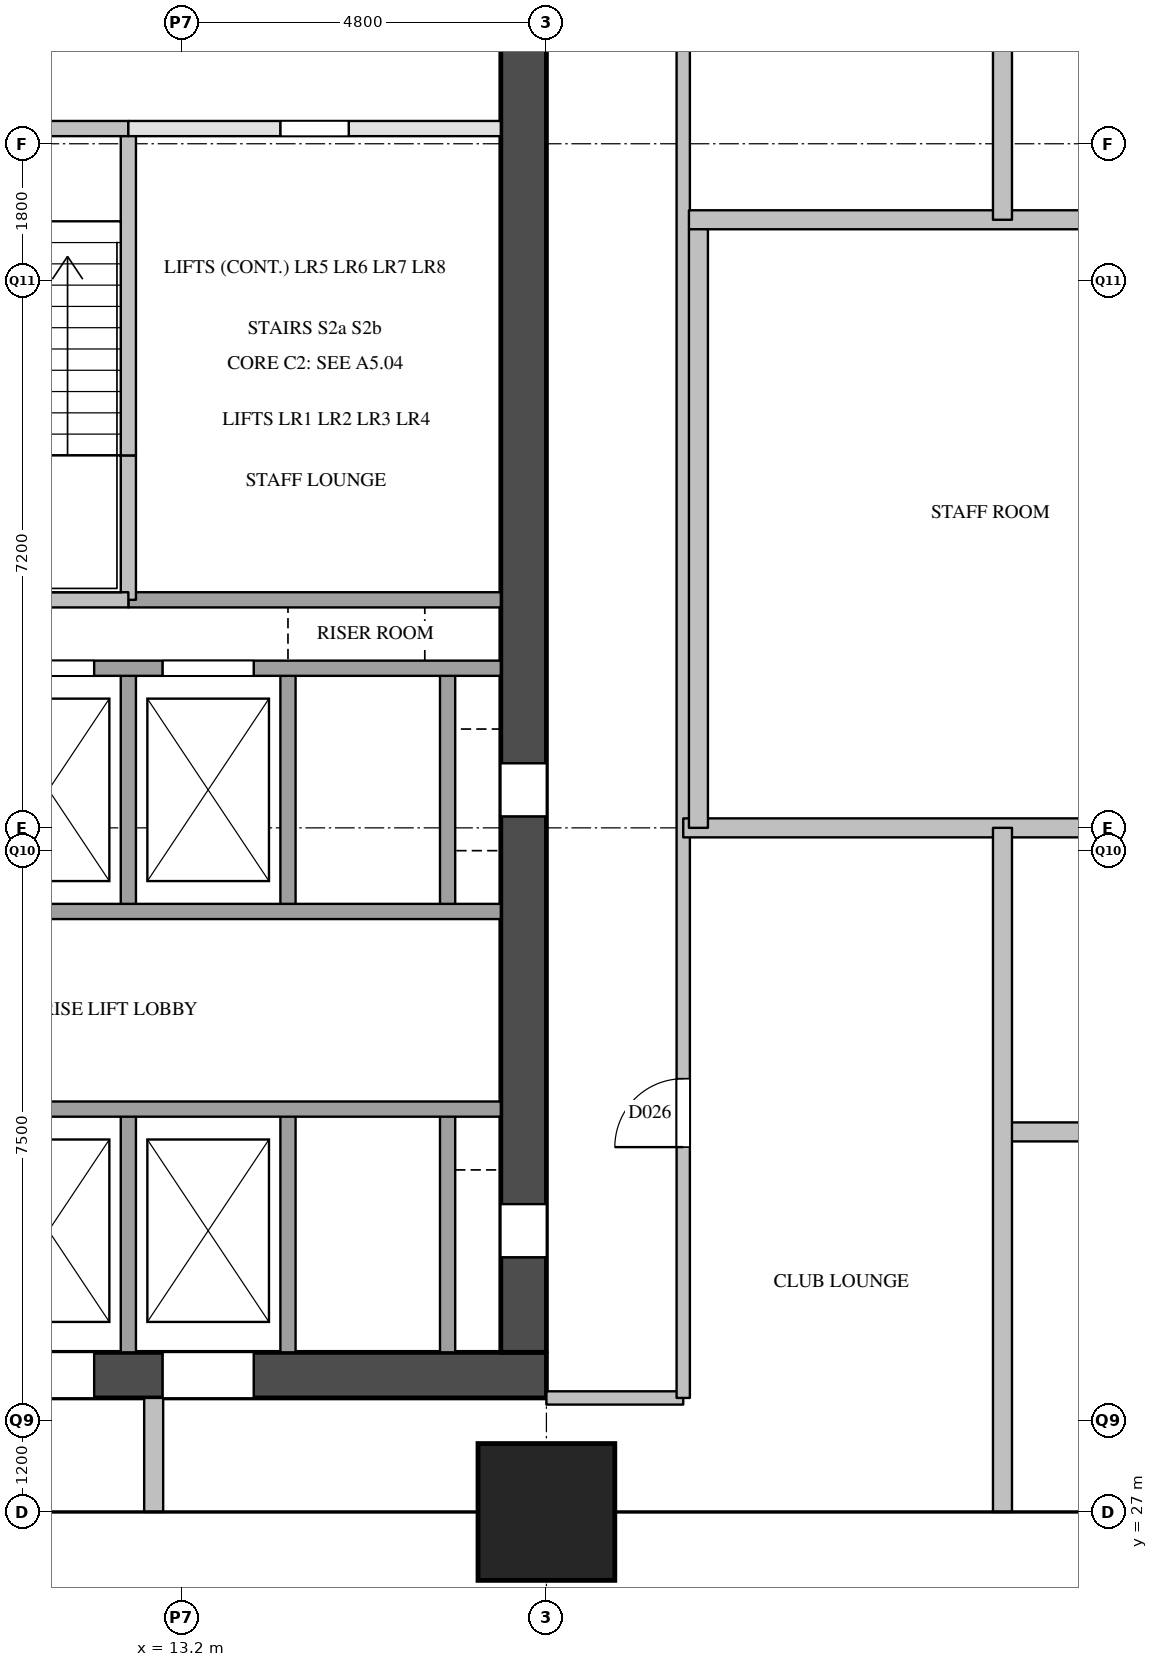
"""IFC4 building model, lengths in metres.
Left out: names, types, materials, properties, quantities, classifications, styles, units other than length and angle.
Written with IfcOpenShell. Run it as: python <this file> out.ifc"""

import sys

from ifc_helpers import new_model, si_unit, direction, frame, frame_2d, origin, origin_2d, place, context, subcontext, project, spatial, rectangle, extrude, element, fill, save


model = new_model("IFC4")
c1 = context("Model", 3, precision=1e-05, world=origin(), true_north=direction((0.0, 1.0)))
c2 = subcontext(c1, "Body", "Model", "MODEL_VIEW")
j1 = project(units=[si_unit("LENGTHUNIT", "METRE"), si_unit("PLANEANGLEUNIT", "RADIAN")], contexts=[c1])
p1 = place(None, origin())
s1 = spatial("IfcSite", under=j1, at=p1, CompositionType="ELEMENT")
p2 = place(p1, origin())
s2 = spatial("IfcBuilding", under=s1, at=p2, CompositionType="ELEMENT")
p3 = place(p2, frame((0.0, 0.0, 108.2)))
s3 = spatial("IfcBuildingStorey", under=s2, at=p3, CompositionType="ELEMENT", Elevation=108.2)
p4 = place(p3, frame((18.0, 27.0, 0.0), z_axis=(0.0, 0.0, 1.0), x_axis=(1.0, 0.0, 0.0)))
e1 = element("IfcColumn", 1, at=p4, inside=s3, PredefinedType="COLUMN", context=c2, shape_type="SweptSolid", body=[
    extrude(rectangle(XDim=1.8, YDim=1.8, at=origin_2d()), origin(), (0.0, 0.0, 1.0), 3.8),
])
p5 = place(p3, frame((5.6, 28.8, 0.0), z_axis=(0.0, 0.0, 1.0), x_axis=(1.0, 0.0, 0.0)))
e2 = element("IfcWall", 2, at=p5, inside=s3, PredefinedType="SHEAR", context=c2, shape_type="SweptSolid", body=[
    extrude(rectangle(XDim=12.4, YDim=0.6, at=frame_2d((6.2, 0.0))), origin(), (0.0, 0.0, 1.0), 3.5),
])
p6 = place(p5, frame((1.05, 0.0, 0.0)))
e3 = element("IfcOpeningElement", 3, at=p6, cuts=e2, PredefinedType="OPENING", context=c2, shape_type="SweptSolid", body=[
    extrude(rectangle(XDim=1.2, YDim=2.1, at=frame_2d((0.6, 1.05))), frame((0.0, 0.31, 0.0), z_axis=(0.0, -1.0, 0.0), x_axis=(1.0, 0.0, 0.0)), (0.0, 0.0, 1.0), 0.62),
])
p7 = place(p5, frame((5.25, 0.0, 0.0)))
e4 = element("IfcOpeningElement", 4, at=p7, cuts=e2, PredefinedType="OPENING", context=c2, shape_type="SweptSolid", body=[
    extrude(rectangle(XDim=1.2, YDim=2.1, at=frame_2d((0.6, 1.05))), frame((0.0, 0.31, 0.0), z_axis=(0.0, -1.0, 0.0), x_axis=(1.0, 0.0, 0.0)), (0.0, 0.0, 1.0), 0.62),
])
p8 = place(p5, frame((7.35, 0.0, 0.0)))
e5 = element("IfcOpeningElement", 5, at=p8, cuts=e2, PredefinedType="OPENING", context=c2, shape_type="SweptSolid", body=[
    extrude(rectangle(XDim=1.2, YDim=2.1, at=frame_2d((0.6, 1.05))), frame((0.0, 0.31, 0.0), z_axis=(0.0, -1.0, 0.0), x_axis=(1.0, 0.0, 0.0)), (0.0, 0.0, 1.0), 0.62),
])
p9 = place(p3, frame((17.7, 29.1, 0.0), z_axis=(0.0, 0.0, 1.0), x_axis=(0.0, 1.0, 0.0)))
e6 = element("IfcWall", 6, at=p9, inside=s3, PredefinedType="SHEAR", context=c2, shape_type="SweptSolid", body=[
    extrude(rectangle(XDim=20.3, YDim=0.6, at=frame_2d((10.15, 0.0))), origin(), (0.0, 0.0, 1.0), 3.5),
])
p10 = place(p9, frame((1.25, 0.0, 0.0)))
e7 = element("IfcOpeningElement", 7, at=p10, cuts=e6, PredefinedType="OPENING", context=c2, shape_type="SweptSolid", body=[
    extrude(rectangle(XDim=0.7, YDim=2.1, at=frame_2d((0.35, 1.05))), frame((0.0, 0.31, 0.0), z_axis=(0.0, -1.0, 0.0), x_axis=(1.0, 0.0, 0.0)), (0.0, 0.0, 1.0), 0.62),
])
p11 = place(p9, frame((7.05, 0.0, 0.0)))
e8 = element("IfcOpeningElement", 8, at=p11, cuts=e6, PredefinedType="OPENING", context=c2, shape_type="SweptSolid", body=[
    extrude(rectangle(XDim=0.7, YDim=2.1, at=frame_2d((0.35, 1.05))), frame((0.0, 0.31, 0.0), z_axis=(0.0, -1.0, 0.0), x_axis=(1.0, 0.0, 0.0)), (0.0, 0.0, 1.0), 0.62),
])
p12 = place(p3, frame((12.5, 29.1, 0.0), z_axis=(0.0, 0.0, 1.0), x_axis=(0.0, 1.0, 0.0)))
e9 = element("IfcWall", 9, at=p12, inside=s3, PredefinedType="SOLIDWALL", context=c2, shape_type="SweptSolid", body=[
    extrude(rectangle(XDim=3.2, YDim=0.2, at=frame_2d((1.6, 0.0))), origin(), (0.0, 0.0, 1.0), 3.5),
])
p13 = place(p3, frame((12.5, 34.9, 0.0), z_axis=(0.0, 0.0, 1.0), x_axis=(0.0, 1.0, 0.0)))
e10 = element("IfcWall", 10, at=p13, inside=s3, PredefinedType="SOLIDWALL", context=c2, shape_type="SweptSolid", body=[
    extrude(rectangle(XDim=3.2, YDim=0.2, at=frame_2d((1.6, 0.0))), origin(), (0.0, 0.0, 1.0), 3.5),
])
p14 = place(p3, frame((12.5, 39.0, 0.0), z_axis=(0.0, 0.0, 1.0), x_axis=(0.0, 1.0, 0.0)))
e11 = element("IfcWall", 11, at=p14, inside=s3, PredefinedType="SOLIDWALL", context=c2, shape_type="SweptSolid", body=[
    extrude(rectangle(XDim=1.9, YDim=0.2, at=frame_2d((0.95, 0.0))), origin(), (0.0, 0.0, 1.0), 3.5),
])
p15 = place(p3, frame((12.5, 40.9, 0.0), z_axis=(0.0, 0.0, 1.0), x_axis=(0.0, 1.0, 0.0)))
e12 = element("IfcWall", 12, at=p15, inside=s3, PredefinedType="SOLIDWALL", context=c2, shape_type="SweptSolid", body=[
    extrude(rectangle(XDim=4.3, YDim=0.2, at=frame_2d((2.15, 0.0))), origin(), (0.0, 0.0, 1.0), 3.5),
])
p16 = place(p3, frame((14.6, 29.1, 0.0), z_axis=(0.0, 0.0, 1.0), x_axis=(0.0, 1.0, 0.0)))
e13 = element("IfcWall", 13, at=p16, inside=s3, PredefinedType="SOLIDWALL", context=c2, shape_type="SweptSolid", body=[
    extrude(rectangle(XDim=3.2, YDim=0.2, at=frame_2d((1.6, 0.0))), origin(), (0.0, 0.0, 1.0), 3.5),
])
p17 = place(p3, frame((14.6, 34.9, 0.0), z_axis=(0.0, 0.0, 1.0), x_axis=(0.0, 1.0, 0.0)))
e14 = element("IfcWall", 14, at=p17, inside=s3, PredefinedType="SOLIDWALL", context=c2, shape_type="SweptSolid", body=[
    extrude(rectangle(XDim=3.2, YDim=0.2, at=frame_2d((1.6, 0.0))), origin(), (0.0, 0.0, 1.0), 3.5),
])
p18 = place(p3, frame((16.7, 29.1, 0.0), z_axis=(0.0, 0.0, 1.0), x_axis=(0.0, 1.0, 0.0)))
e15 = element("IfcWall", 15, at=p18, inside=s3, PredefinedType="SOLIDWALL", context=c2, shape_type="SweptSolid", body=[
    extrude(rectangle(XDim=3.2, YDim=0.2, at=frame_2d((1.6, 0.0))), origin(), (0.0, 0.0, 1.0), 3.5),
])
p19 = place(p3, frame((16.7, 34.9, 0.0), z_axis=(0.0, 0.0, 1.0), x_axis=(0.0, 1.0, 0.0)))
e16 = element("IfcWall", 16, at=p19, inside=s3, PredefinedType="SOLIDWALL", context=c2, shape_type="SweptSolid", body=[
    extrude(rectangle(XDim=3.2, YDim=0.2, at=frame_2d((1.6, 0.0))), origin(), (0.0, 0.0, 1.0), 3.5),
])
p20 = place(p3, frame((6.2, 32.3, 0.0), z_axis=(0.0, 0.0, 1.0), x_axis=(1.0, 0.0, 0.0)))
e17 = element("IfcWall", 17, at=p20, inside=s3, PredefinedType="SOLIDWALL", context=c2, shape_type="SweptSolid", body=[
    extrude(rectangle(XDim=11.2, YDim=0.2, at=frame_2d((5.6, 0.0))), origin(), (0.0, 0.0, 1.0), 3.5),
])
p21 = place(p20, frame((2.55, 0.0, 0.0)))
e18 = element("IfcOpeningElement", 18, at=p21, cuts=e17, PredefinedType="OPENING", context=c2, shape_type="SweptSolid", body=[
    extrude(rectangle(XDim=1.2, YDim=2.1, at=frame_2d((0.6, 1.05))), frame((0.0, 0.11, 0.0), z_axis=(0.0, -1.0, 0.0), x_axis=(1.0, 0.0, 0.0)), (0.0, 0.0, 1.0), 0.22),
])
p22 = place(p3, frame((6.2, 34.9, 0.0), z_axis=(0.0, 0.0, 1.0), x_axis=(1.0, 0.0, 0.0)))
e19 = element("IfcWall", 19, at=p22, inside=s3, PredefinedType="SOLIDWALL", context=c2, shape_type="SweptSolid", body=[
    extrude(rectangle(XDim=11.2, YDim=0.2, at=frame_2d((5.6, 0.0))), origin(), (0.0, 0.0, 1.0), 3.5),
])
p23 = place(p3, frame((6.2, 38.1, 0.0), z_axis=(0.0, 0.0, 1.0), x_axis=(1.0, 0.0, 0.0)))
e20 = element("IfcWall", 20, at=p23, inside=s3, PredefinedType="SOLIDWALL", context=c2, shape_type="SweptSolid", body=[
    extrude(rectangle(XDim=11.2, YDim=0.2, at=frame_2d((5.6, 0.0))), origin(), (0.0, 0.0, 1.0), 3.5),
])
p24 = place(p23, frame((0.45, 0.0, 0.0)))
e21 = element("IfcOpeningElement", 21, at=p24, cuts=e20, PredefinedType="OPENING", context=c2, shape_type="SweptSolid", body=[
    extrude(rectangle(XDim=1.2, YDim=2.1, at=frame_2d((0.6, 1.05))), frame((0.0, 0.11, 0.0), z_axis=(0.0, -1.0, 0.0), x_axis=(1.0, 0.0, 0.0)), (0.0, 0.0, 1.0), 0.22),
])
p25 = place(p23, frame((2.55, 0.0, 0.0)))
e22 = element("IfcOpeningElement", 22, at=p25, cuts=e20, PredefinedType="OPENING", context=c2, shape_type="SweptSolid", body=[
    extrude(rectangle(XDim=1.2, YDim=2.1, at=frame_2d((0.6, 1.05))), frame((0.0, 0.11, 0.0), z_axis=(0.0, -1.0, 0.0), x_axis=(1.0, 0.0, 0.0)), (0.0, 0.0, 1.0), 0.22),
])
p26 = place(p23, frame((4.65, 0.0, 0.0)))
e23 = element("IfcOpeningElement", 23, at=p26, cuts=e20, PredefinedType="OPENING", context=c2, shape_type="SweptSolid", body=[
    extrude(rectangle(XDim=1.2, YDim=2.1, at=frame_2d((0.6, 1.05))), frame((0.0, 0.11, 0.0), z_axis=(0.0, -1.0, 0.0), x_axis=(1.0, 0.0, 0.0)), (0.0, 0.0, 1.0), 0.22),
])
p27 = place(p23, frame((6.75, 0.0, 0.0)))
e24 = element("IfcOpeningElement", 24, at=p27, cuts=e20, PredefinedType="OPENING", context=c2, shape_type="SweptSolid", body=[
    extrude(rectangle(XDim=1.2, YDim=2.1, at=frame_2d((0.6, 1.05))), frame((0.0, 0.11, 0.0), z_axis=(0.0, -1.0, 0.0), x_axis=(1.0, 0.0, 0.0)), (0.0, 0.0, 1.0), 0.22),
])
p28 = place(p3, frame((12.5, 39.0, 0.0), z_axis=(0.0, 0.0, 1.0), x_axis=(1.0, 0.0, 0.0)))
e25 = element("IfcWall", 25, at=p28, inside=s3, PredefinedType="SOLIDWALL", context=c2, shape_type="SweptSolid", body=[
    extrude(rectangle(XDim=4.9, YDim=0.2, at=frame_2d((2.45, 0.0))), origin(), (0.0, 0.0, 1.0), 3.5),
])
p29 = place(p3, frame((9.45, 39.0, 0.0), z_axis=(0.0, 0.0, 1.0), x_axis=(1.0, 0.0, 0.0)))
e26 = element("IfcWall", 26, at=p29, inside=s3, PredefinedType="SOLIDWALL", context=c2, shape_type="SweptSolid", body=[
    extrude(rectangle(XDim=3.05, YDim=0.2, at=frame_2d((1.525, 0.0))), origin(), (0.0, 0.0, 1.0), 3.5),
])
p30 = place(p3, frame((12.5, 45.2, 0.0), z_axis=(0.0, 0.0, 1.0), x_axis=(1.0, 0.0, 0.0)))
e27 = element("IfcWall", 27, at=p30, inside=s3, PredefinedType="PARTITIONING", context=c2, shape_type="SweptSolid", body=[
    extrude(rectangle(XDim=4.9, YDim=0.2, at=frame_2d((2.45, 0.0))), origin(), (0.0, 0.0, 1.0), 3.5),
])
p31 = place(p30, frame((2.0, 0.0, 0.0)))
e28 = element("IfcOpeningElement", 28, at=p31, cuts=e27, PredefinedType="OPENING", context=c2, shape_type="SweptSolid", body=[
    extrude(rectangle(XDim=0.9, YDim=2.1, at=frame_2d((0.45, 1.05))), frame((0.0, 0.11, 0.0), z_axis=(0.0, -1.0, 0.0), x_axis=(1.0, 0.0, 0.0)), (0.0, 0.0, 1.0), 0.22),
])
p32 = place(p3, frame((6.2, 45.2, 0.0), z_axis=(0.0, 0.0, 1.0), x_axis=(1.0, 0.0, 0.0)))
e29 = element("IfcWall", 29, at=p32, inside=s3, PredefinedType="SOLIDWALL", context=c2, shape_type="SweptSolid", body=[
    extrude(rectangle(XDim=6.3, YDim=0.2, at=frame_2d((3.15, 0.0))), origin(), (0.0, 0.0, 1.0), 3.5),
])
p33 = place(p32, frame((1.025, 0.0, 0.0)))
e30 = element("IfcOpeningElement", 30, at=p33, cuts=e29, PredefinedType="OPENING", context=c2, shape_type="SweptSolid", body=[
    extrude(rectangle(XDim=1.1, YDim=2.1, at=frame_2d((0.55, 1.05))), frame((0.0, 0.11, 0.0), z_axis=(0.0, -1.0, 0.0), x_axis=(1.0, 0.0, 0.0)), (0.0, 0.0, 1.0), 0.22),
])
p34 = place(p32, frame((4.175, 0.0, 0.0)))
e31 = element("IfcOpeningElement", 31, at=p34, cuts=e29, PredefinedType="OPENING", context=c2, shape_type="SweptSolid", body=[
    extrude(rectangle(XDim=1.1, YDim=2.1, at=frame_2d((0.55, 1.05))), frame((0.0, 0.11, 0.0), z_axis=(0.0, -1.0, 0.0), x_axis=(1.0, 0.0, 0.0)), (0.0, 0.0, 1.0), 0.22),
])
p35 = place(p3, frame((18.0, 28.5, 0.0), z_axis=(0.0, 0.0, 1.0), x_axis=(1.0, 0.0, 0.0)))
e32 = element("IfcWall", 32, at=p35, inside=s3, PredefinedType="PARTITIONING", context=c2, shape_type="SweptSolid", body=[
    extrude(rectangle(XDim=1.8, YDim=0.175, at=frame_2d((0.9, 0.0))), origin(), (0.0, 0.0, 1.0), 3.5),
])
p36 = place(p3, frame((19.8, 28.5, 0.0), z_axis=(0.0, 0.0, 1.0), x_axis=(0.0, 1.0, 0.0)))
e33 = element("IfcWall", 33, at=p36, inside=s3, PredefinedType="PARTITIONING", context=c2, shape_type="SweptSolid", body=[
    extrude(rectangle(XDim=23.3, YDim=0.175, at=frame_2d((11.65, 0.0))), origin(), (0.0, 0.0, 1.0), 3.5),
])
p37 = place(p36, frame((3.3, 0.0, 0.0)))
e34 = element("IfcOpeningElement", 34, at=p37, cuts=e33, PredefinedType="OPENING", context=c2, shape_type="SweptSolid", body=[
    extrude(rectangle(XDim=0.9, YDim=2.1, at=frame_2d((0.45, 1.05))), frame((0.0, 0.097, 0.0), z_axis=(0.0, -1.0, 0.0), x_axis=(1.0, 0.0, 0.0)), (0.0, 0.0, 1.0), 0.195),
])
p38 = place(p36, frame((17.83, 0.0, 0.0)))
e35 = element("IfcOpeningElement", 35, at=p38, cuts=e33, PredefinedType="OPENING", context=c2, shape_type="SweptSolid", body=[
    extrude(rectangle(XDim=0.9, YDim=2.1, at=frame_2d((0.45, 1.05))), frame((0.0, 0.097, 0.0), z_axis=(0.0, -1.0, 0.0), x_axis=(1.0, 0.0, 0.0)), (0.0, 0.0, 1.0), 0.195),
])
p39 = place(p3, frame((24.0, 32.0, 0.0), z_axis=(0.0, 0.0, 1.0), x_axis=(1.0, 0.0, 0.0)))
e36 = element("IfcWall", 36, at=p39, inside=s3, PredefinedType="PARTITIONING", context=c2, shape_type="SweptSolid", body=[
    extrude(rectangle(XDim=10.2, YDim=0.25, at=frame_2d((5.1, 0.0))), origin(), (0.0, 0.0, 1.0), 2.5),
])
p40 = place(p3, frame((19.8, 36.0, 0.0), z_axis=(0.0, 0.0, 1.0), x_axis=(1.0, 0.0, 0.0)))
e37 = element("IfcWall", 37, at=p40, inside=s3, PredefinedType="PARTITIONING", context=c2, shape_type="SweptSolid", body=[
    extrude(rectangle(XDim=14.4, YDim=0.25, at=frame_2d((7.2, 0.0))), origin(), (0.0, 0.0, 1.0), 3.5),
])
p41 = place(p3, frame((19.875, 44.0, 0.0), z_axis=(0.0, 0.0, 1.0), x_axis=(1.0, 0.0, 0.0)))
e38 = element("IfcWall", 38, at=p41, inside=s3, PredefinedType="PARTITIONING", context=c2, shape_type="SweptSolid", body=[
    extrude(rectangle(XDim=14.325, YDim=0.25, at=frame_2d((7.163, 0.0))), origin(), (0.0, 0.0, 1.0), 2.5),
])
p42 = place(p3, frame((12.833, 27.0, 0.0), z_axis=(0.0, 0.0, 1.0), x_axis=(0.0, 1.0, 0.0)))
e39 = element("IfcWall", 39, at=p42, inside=s3, PredefinedType="PARTITIONING", context=c2, shape_type="SweptSolid", body=[
    extrude(rectangle(XDim=1.5, YDim=0.25, at=frame_2d((0.75, 0.0))), origin(), (0.0, 0.0, 1.0), 2.5),
])
p43 = place(p3, frame((20.0, 36.0, 0.0), z_axis=(0.0, 0.0, 1.0), x_axis=(0.0, 1.0, 0.0)))
e40 = element("IfcWall", 40, at=p43, inside=s3, PredefinedType="PARTITIONING", context=c2, shape_type="SweptSolid", body=[
    extrude(rectangle(XDim=7.875, YDim=0.25, at=frame_2d((3.938, 0.0))), origin(), (0.0, 0.0, 1.0), 3.5),
])
p44 = place(p3, frame((24.0, 27.0, 0.0), z_axis=(0.0, 0.0, 1.0), x_axis=(0.0, 1.0, 0.0)))
e41 = element("IfcWall", 41, at=p44, inside=s3, PredefinedType="PARTITIONING", context=c2, shape_type="SweptSolid", body=[
    extrude(rectangle(XDim=9.0, YDim=0.25, at=frame_2d((4.5, 0.0))), origin(), (0.0, 0.0, 1.0), 2.5),
])
p45 = place(p3, frame((24.0, 44.0, 0.0), z_axis=(0.0, 0.0, 1.0), x_axis=(0.0, 1.0, 0.0)))
e42 = element("IfcWall", 42, at=p45, inside=s3, PredefinedType="PARTITIONING", context=c2, shape_type="SweptSolid", body=[
    extrude(rectangle(XDim=10.0, YDim=0.25, at=frame_2d((5.0, 0.0))), origin(), (0.0, 0.0, 1.0), 2.5),
])
p46 = place(p7, origin())
e43 = element("IfcDoor", 43, at=p46, inside=s3, OperationType="SLIDING_TO_LEFT", PredefinedType="DOOR", context=c2, shape_type="SweptSolid", body=[
    extrude(rectangle(XDim=1.2, YDim=2.1, at=frame_2d((0.6, 1.05))), frame((0.0, 0.025, 0.0), z_axis=(0.0, -1.0, 0.0), x_axis=(1.0, 0.0, 0.0)), (0.0, 0.0, 1.0), 0.05),
])
fill(e4, e43)
p47 = place(p8, origin())
e44 = element("IfcDoor", 44, at=p47, inside=s3, OperationType="SLIDING_TO_LEFT", PredefinedType="DOOR", context=c2, shape_type="SweptSolid", body=[
    extrude(rectangle(XDim=1.2, YDim=2.1, at=frame_2d((0.6, 1.05))), frame((0.0, 0.025, 0.0), z_axis=(0.0, -1.0, 0.0), x_axis=(1.0, 0.0, 0.0)), (0.0, 0.0, 1.0), 0.05),
])
fill(e5, e44)
p48 = place(p26, origin())
e45 = element("IfcDoor", 45, at=p48, inside=s3, OperationType="SLIDING_TO_LEFT", PredefinedType="DOOR", context=c2, shape_type="SweptSolid", body=[
    extrude(rectangle(XDim=1.2, YDim=2.1, at=frame_2d((0.6, 1.05))), frame((0.0, 0.025, 0.0), z_axis=(0.0, -1.0, 0.0), x_axis=(1.0, 0.0, 0.0)), (0.0, 0.0, 1.0), 0.05),
])
fill(e23, e45)
p49 = place(p27, origin())
e46 = element("IfcDoor", 46, at=p49, inside=s3, OperationType="SLIDING_TO_LEFT", PredefinedType="DOOR", context=c2, shape_type="SweptSolid", body=[
    extrude(rectangle(XDim=1.2, YDim=2.1, at=frame_2d((0.6, 1.05))), frame((0.0, 0.025, 0.0), z_axis=(0.0, -1.0, 0.0), x_axis=(1.0, 0.0, 0.0)), (0.0, 0.0, 1.0), 0.05),
])
fill(e24, e46)
p50 = place(p10, origin())
e47 = element("IfcDoor", 47, at=p50, inside=s3, OperationType="SINGLE_SWING_LEFT", PredefinedType="DOOR", context=c2, shape_type="SweptSolid", body=[
    extrude(rectangle(XDim=0.7, YDim=2.1, at=frame_2d((0.35, 1.05))), frame((0.0, 0.025, 0.0), z_axis=(0.0, -1.0, 0.0), x_axis=(1.0, 0.0, 0.0)), (0.0, 0.0, 1.0), 0.05),
])
fill(e7, e47)
p51 = place(p11, origin())
e48 = element("IfcDoor", 48, at=p51, inside=s3, OperationType="SINGLE_SWING_LEFT", PredefinedType="DOOR", context=c2, shape_type="SweptSolid", body=[
    extrude(rectangle(XDim=0.7, YDim=2.1, at=frame_2d((0.35, 1.05))), frame((0.0, 0.025, 0.0), z_axis=(0.0, -1.0, 0.0), x_axis=(1.0, 0.0, 0.0)), (0.0, 0.0, 1.0), 0.05),
])
fill(e8, e48)
p52 = place(p31, origin())
e49 = element("IfcDoor", 49, at=p52, inside=s3, OperationType="SINGLE_SWING_RIGHT", PredefinedType="DOOR", context=c2, shape_type="SweptSolid", body=[
    extrude(rectangle(XDim=0.9, YDim=2.1, at=frame_2d((0.45, 1.05))), frame((0.0, 0.025, 0.0), z_axis=(0.0, -1.0, 0.0), x_axis=(1.0, 0.0, 0.0)), (0.0, 0.0, 1.0), 0.05),
])
fill(e28, e49)
p53 = place(p37, origin())
e50 = element("IfcDoor", 50, at=p53, inside=s3, OperationType="SINGLE_SWING_LEFT", PredefinedType="DOOR", context=c2, shape_type="SweptSolid", body=[
    extrude(rectangle(XDim=0.9, YDim=2.1, at=frame_2d((0.45, 1.05))), frame((0.0, 0.025, 0.0), z_axis=(0.0, -1.0, 0.0), x_axis=(1.0, 0.0, 0.0)), (0.0, 0.0, 1.0), 0.05),
])
fill(e34, e50)
save(model, sys.argv[1])
